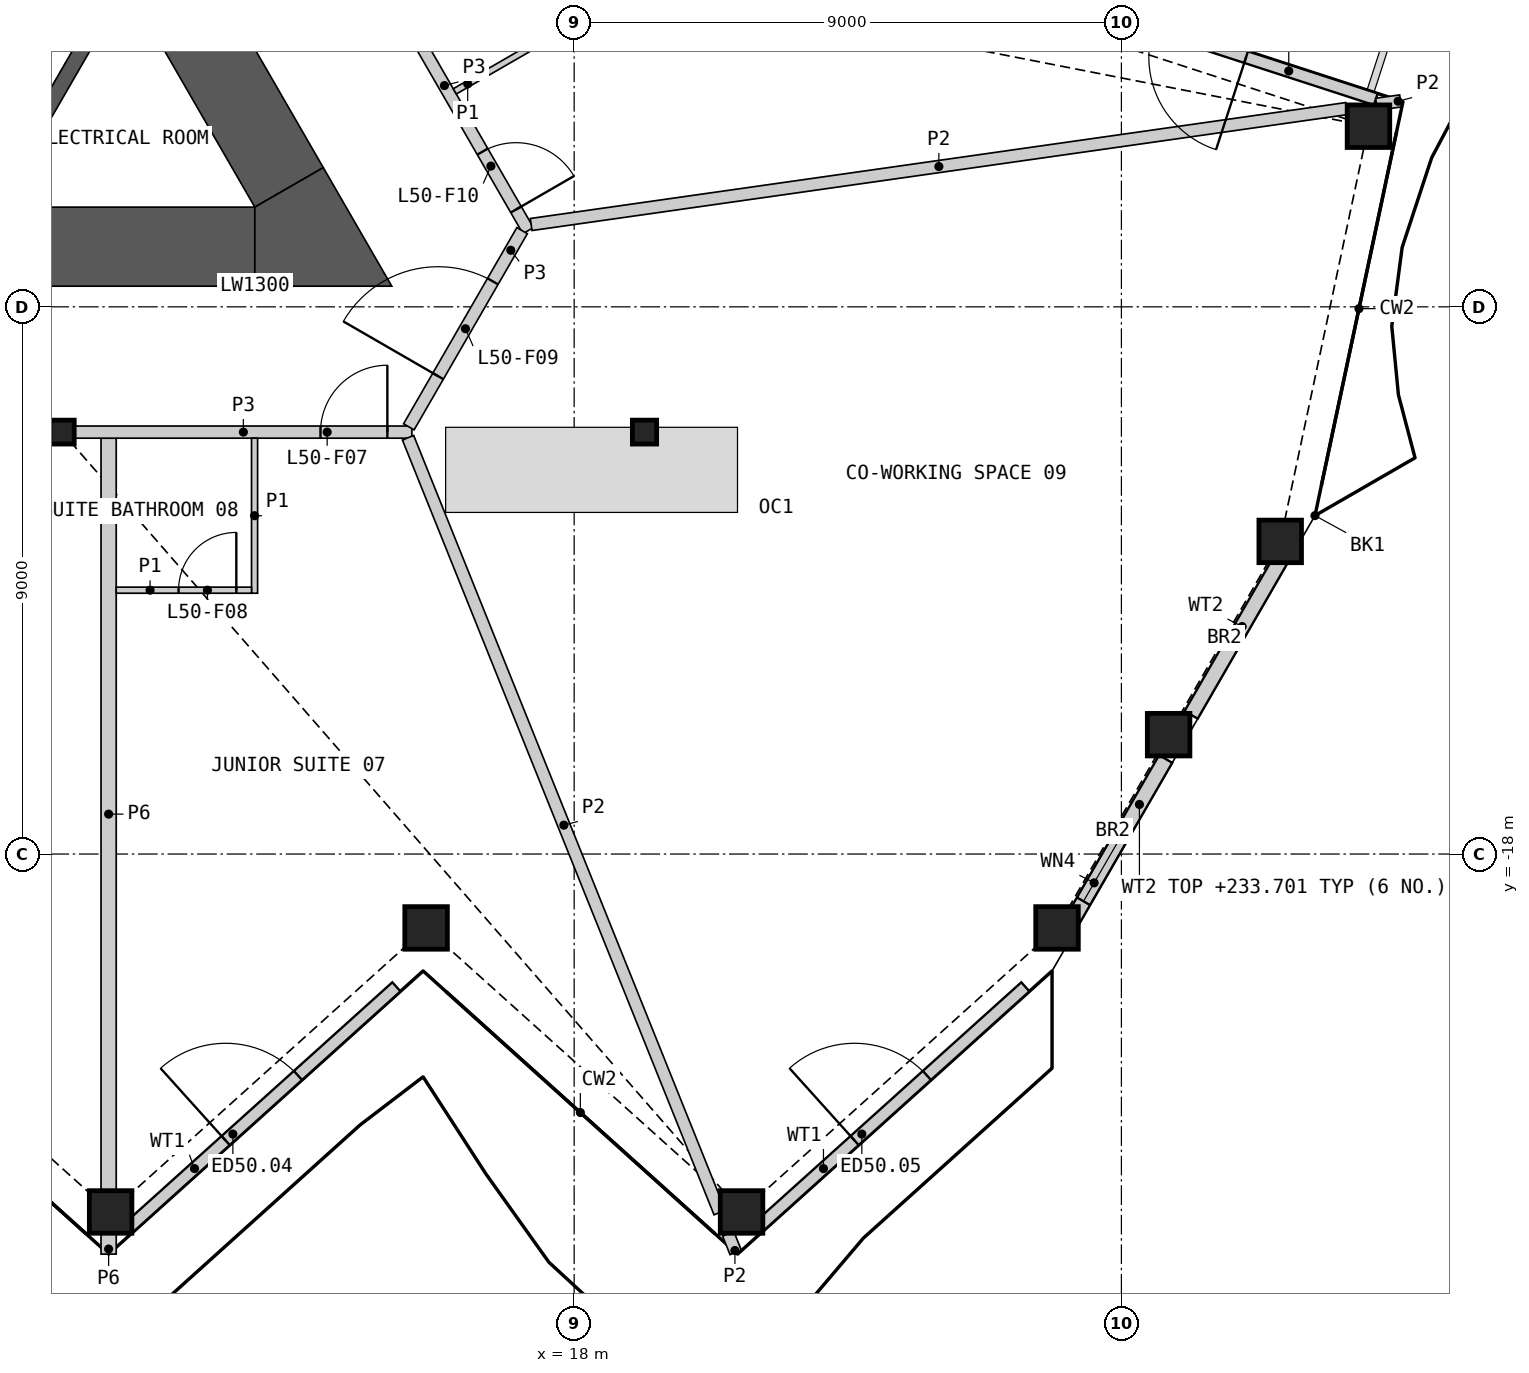
"""IFC4 building model, lengths in metres.
Left out: names, types, materials, properties, quantities, classifications, styles, units other than length and angle.
Written with IfcOpenShell. Run it as: python <this file> out.ifc"""

import sys

from ifc_helpers import new_model, si_unit, direction, frame, frame_2d, origin, origin_2d, place, context, subcontext, project, spatial, polyline, rectangle, hollow_rectangle, i_section, outline, extrude, element, fill, save


model = new_model("IFC4")
c1 = context("Model", 3, precision=1e-05, world=origin(), true_north=direction((0.0, 1.0)))
c2 = subcontext(c1, "Body", "Model", "MODEL_VIEW")
j1 = project(units=[si_unit("LENGTHUNIT", "METRE"), si_unit("PLANEANGLEUNIT", "RADIAN")], contexts=[c1])
p1 = place(None, origin())
s1 = spatial("IfcSite", under=j1, at=p1, CompositionType="ELEMENT")
p2 = place(p1, origin())
s2 = spatial("IfcBuilding", under=s1, at=p2, CompositionType="ELEMENT")
p3 = place(p2, frame((0.0, 0.0, 231.0)))
s3 = spatial("IfcBuildingStorey", under=s2, at=p3, CompositionType="ELEMENT", Elevation=231.0)
for number, where, z_axis, x_axis in (
    (1, (10.376, -23.887, 0.0), (0.0, 0.0, 1.0), (1.0, 0.0, 0.0)),
    (2, (15.565, -19.215, 0.0), (0.0, 0.0, 1.0), (1.0, 0.0, 0.0)),
    (3, (20.753, -23.887, 0.0), (0.0, 0.0, 1.0), (1.0, 0.0, 0.0)),
    (4, (25.941, -19.215, 0.0), (0.0, 0.0, 1.0), (1.0, 0.0, 0.0)),
    (5, (27.776, -16.037, 0.0), (0.0, 0.0, 1.0), (1.0, 0.0, 0.0)),
    (6, (29.612, -12.858, 0.0), (0.0, 0.0, 1.0), (1.0, 0.0, 0.0)),
    (7, (31.063, -6.029, 0.0), (0.0, 0.0, 1.0), (1.0, 0.0, 0.0)),
):
    element("IfcColumn", number, at=place(p3, frame(where, z_axis=z_axis, x_axis=x_axis)), inside=s3, PredefinedType="COLUMN", context=c2, shape_type="SweptSolid", body=[
        extrude(hollow_rectangle(XDim=0.7, YDim=0.7, WallThickness=0.045, at=origin_2d()), origin(), (0.0, 0.0, 1.0), 3.6),
    ])
for number, where, z_axis, x_axis in (
    (8, (9.578, -11.06, 0.0), (0.0, 0.0, 1.0), (1.0, 0.0, 0.0)),
    (9, (19.157, -11.06, 0.0), (0.0, 0.0, 1.0), (1.0, 0.0, 0.0)),
):
    element("IfcColumn", number, at=place(p3, frame(where, z_axis=z_axis, x_axis=x_axis)), inside=s3, PredefinedType="COLUMN", context=c2, shape_type="SweptSolid", body=[
        extrude(i_section(OverallWidth=0.399, OverallDepth=0.393, WebThickness=0.023, FlangeThickness=0.037, at=origin_2d()), origin(), (0.0, 0.0, 1.0), 3.6),
    ])
p4 = place(p3, frame((10.649, -24.17, 0.0), z_axis=(0.0, 0.0, 1.0), x_axis=(0.743143336638, 0.669132259878, 0.0)))
e10 = element("IfcWall", 10, at=p4, inside=s3, PredefinedType="SOLIDWALL", context=c2, shape_type="SweptSolid", body=[
    extrude(rectangle(XDim=5.958, YDim=0.2, at=frame_2d((2.979, 0.0))), origin(), (0.0, 0.0, 1.0), 2.701),
])
p5 = place(p4, frame((2.179, 0.0, 0.0)))
e11 = element("IfcOpeningElement", 11, at=p5, cuts=e10, PredefinedType="OPENING", context=c2, shape_type="SweptSolid", body=[
    extrude(rectangle(XDim=1.6, YDim=2.4, at=frame_2d((0.8, 1.2))), frame((0.0, 0.11, 0.0), z_axis=(0.0, -1.0, 0.0), x_axis=(1.0, 0.0, 0.0)), (0.0, 0.0, 1.0), 0.22),
])
p6 = place(p3, frame((20.993, -24.17, 0.0), z_axis=(0.0, 0.0, 1.0), x_axis=(0.743143336638, 0.669132259878, 0.0)))
e12 = element("IfcWall", 12, at=p6, inside=s3, PredefinedType="SOLIDWALL", context=c2, shape_type="SweptSolid", body=[
    extrude(rectangle(XDim=5.958, YDim=0.2, at=frame_2d((2.979, 0.0))), origin(), (0.0, 0.0, 1.0), 2.701),
])
p7 = place(p6, frame((2.179, 0.0, 0.0)))
e13 = element("IfcOpeningElement", 13, at=p7, cuts=e12, PredefinedType="OPENING", context=c2, shape_type="SweptSolid", body=[
    extrude(rectangle(XDim=1.6, YDim=2.4, at=frame_2d((0.8, 1.2))), frame((0.0, 0.11, 0.0), z_axis=(0.0, -1.0, 0.0), x_axis=(1.0, 0.0, 0.0)), (0.0, 0.0, 1.0), 0.22),
])
p8 = place(p3, frame((26.002, -19.427, 0.0), z_axis=(0.0, 0.0, 1.0), x_axis=(0.499987726745, 0.866032489635, 0.0)))
e14 = element("IfcWall", 14, at=p8, inside=s3, PredefinedType="SOLIDWALL", context=c2, shape_type="SweptSolid", body=[
    extrude(rectangle(XDim=3.452, YDim=0.25, at=frame_2d((1.726, 0.0))), origin(), (0.0, 0.0, 1.0), 2.701),
])
p9 = place(p8, frame((0.75, 0.0, 1.8)))
e15 = element("IfcOpeningElement", 15, at=p9, cuts=e14, PredefinedType="OPENING", context=c2, shape_type="SweptSolid", body=[
    extrude(rectangle(XDim=1.4, YDim=0.7, at=frame_2d((0.7, 0.35))), frame((0.0, 0.135, 0.0), z_axis=(0.0, -1.0, 0.0), x_axis=(1.0, 0.0, 0.0)), (0.0, 0.0, 1.0), 0.27),
])
p10 = place(p3, frame((28.146, -15.712, 0.0), z_axis=(0.0, 0.0, 1.0), x_axis=(0.500003693016, 0.86602327161, 0.0)))
e16 = element("IfcWall", 16, at=p10, inside=s3, PredefinedType="SOLIDWALL", context=c2, shape_type="SweptSolid", body=[
    extrude(rectangle(XDim=3.356, YDim=0.25, at=frame_2d((1.678, 0.0))), origin(), (0.0, 0.0, 1.0), 2.701),
])
p11 = place(p3, frame((31.184, -5.586, 0.0), z_axis=(0.0, 0.0, 1.0), x_axis=(-0.95106415783, 0.30899347516, 0.0)))
e17 = element("IfcWall", 17, at=p11, inside=s3, PredefinedType="SOLIDWALL", context=c2, shape_type="SweptSolid", body=[
    extrude(rectangle(XDim=6.021, YDim=0.2, at=frame_2d((3.011, 0.0))), origin(), (0.0, 0.0, 1.0), 2.701),
])
p12 = place(p11, frame((2.243, 0.0, 0.0)))
e18 = element("IfcOpeningElement", 18, at=p12, cuts=e17, PredefinedType="OPENING", context=c2, shape_type="SweptSolid", body=[
    extrude(rectangle(XDim=1.6, YDim=2.4, at=frame_2d((0.8, 1.2))), frame((0.0, 0.11, 0.0), z_axis=(0.0, -1.0, 0.0), x_axis=(1.0, 0.0, 0.0)), (0.0, 0.0, 1.0), 0.22),
])
p13 = place(p3, origin())
e19 = element("IfcWall", 19, at=p13, inside=s3, PredefinedType="SHEAR", context=c2, shape_type="SweptSolid", body=[
    extrude(outline(polyline([(8.83, -6.881), (10.374, -4.206), (10.032, -4.298), (8.738, -6.539), (8.83, -6.881)])), origin(), (0.0, 0.0, 1.0), 3.25),
])
p14 = place(p3, frame((-12.748, -8.01, 0.0), z_axis=(0.0, 0.0, 1.0), x_axis=(1.0, 0.0, 0.0)))
e20 = element("IfcWall", 20, at=p14, inside=s3, PredefinedType="SHEAR", context=c2, shape_type="SweptSolid", body=[
    extrude(rectangle(XDim=25.497, YDim=1.3, at=frame_2d((12.748, 0.0))), origin(), (0.0, 0.0, 1.0), 3.25),
])
p15 = place(p3, frame((13.311, -7.035, 0.0), z_axis=(0.0, 0.0, 1.0), x_axis=(-0.500003555838, 0.866023350811, 0.0)))
e21 = element("IfcWall", 21, at=p15, inside=s3, PredefinedType="SHEAR", context=c2, shape_type="SweptSolid", body=[
    extrude(rectangle(XDim=4.26, YDim=1.3, at=frame_2d((2.13, 0.0))), origin(), (0.0, 0.0, 1.0), 3.25),
])
p16 = place(p3, origin())
e22 = element("IfcWall", 22, at=p16, inside=s3, PredefinedType="SHEAR", context=c2, shape_type="SweptSolid", body=[
    extrude(outline(polyline([(12.748, -8.66), (12.748, -7.36), (13.874, -6.71), (15.0, -8.66), (12.748, -8.66)])), origin(), (0.0, 0.0, 1.0), 3.25),
])
p17 = place(p3, frame((10.344, -23.527, 0.0), z_axis=(0.0, 0.0, 1.0), x_axis=(0.0, 1.0, 0.0)))
e23 = element("IfcWall", 23, at=p17, inside=s3, PredefinedType="PARTITIONING", context=c2, shape_type="SweptSolid", body=[
    extrude(rectangle(XDim=12.366, YDim=0.25, at=frame_2d((6.183, 0.0))), origin(), (0.0, 0.0, 1.0), 2.404),
])
p18 = place(p3, frame((9.788, -11.06, 0.0), z_axis=(0.0, 0.0, 1.0), x_axis=(1.0, 0.0, 0.0)))
e24 = element("IfcWall", 24, at=p18, inside=s3, PredefinedType="PARTITIONING", context=c2, shape_type="SweptSolid", body=[
    extrude(rectangle(XDim=5.543, YDim=0.2, at=frame_2d((2.771, 0.0))), origin(), (0.0, 0.0, 1.0), 3.25),
])
p19 = place(p18, frame((4.04, 0.0, 0.0)))
e25 = element("IfcOpeningElement", 25, at=p19, cuts=e24, PredefinedType="OPENING", context=c2, shape_type="SweptSolid", body=[
    extrude(rectangle(XDim=1.1, YDim=2.1, at=frame_2d((0.55, 1.05))), frame((0.0, 0.11, 0.0), z_axis=(0.0, -1.0, 0.0), x_axis=(1.0, 0.0, 0.0)), (0.0, 0.0, 1.0), 0.22),
])
p20 = place(p3, frame((14.489, -2.975, 0.0), z_axis=(0.0, 0.0, 1.0), x_axis=(0.500017753321, -0.866015153657, 0.0)))
e26 = element("IfcWall", 26, at=p20, inside=s3, PredefinedType="PARTITIONING", context=c2, shape_type="SweptSolid", body=[
    extrude(rectangle(XDim=5.51, YDim=0.2, at=frame_2d((2.755, 0.0))), origin(), (0.0, 0.0, 1.0), 3.25),
])
p21 = place(p20, frame((4.01, 0.0, 0.0)))
e27 = element("IfcOpeningElement", 27, at=p21, cuts=e26, PredefinedType="OPENING", context=c2, shape_type="SweptSolid", body=[
    extrude(rectangle(XDim=1.1, YDim=2.1, at=frame_2d((0.55, 1.05))), frame((0.0, 0.11, 0.0), z_axis=(0.0, -1.0, 0.0), x_axis=(1.0, 0.0, 0.0)), (0.0, 0.0, 1.0), 0.22),
])
p22 = place(p3, frame((15.281, -10.974, 0.0), z_axis=(0.0, 0.0, 1.0), x_axis=(0.499958791762, 0.866049194065, 0.0)))
e28 = element("IfcWall", 28, at=p22, inside=s3, PredefinedType="PARTITIONING", context=c2, shape_type="SweptSolid", body=[
    extrude(rectangle(XDim=3.726, YDim=0.2, at=frame_2d((1.863, 0.0))), origin(), (0.0, 0.0, 1.0), 3.25),
])
p23 = place(p22, frame((0.963, 0.0, 0.0)))
e29 = element("IfcOpeningElement", 29, at=p23, cuts=e28, PredefinedType="OPENING", context=c2, shape_type="SweptSolid", body=[
    extrude(rectangle(XDim=1.8, YDim=2.1, at=frame_2d((0.9, 1.05))), frame((0.0, 0.11, 0.0), z_axis=(0.0, -1.0, 0.0), x_axis=(1.0, 0.0, 0.0)), (0.0, 0.0, 1.0), 0.22),
])
p24 = place(p3, frame((10.344, -24.58, 0.0), z_axis=(0.0, 0.0, 1.0), x_axis=(0.0, 1.0, 0.0)))
e30 = element("IfcWall", 30, at=p24, inside=s3, PredefinedType="PARTITIONING", context=c2, shape_type="SweptSolid", body=[
    extrude(rectangle(XDim=0.333, YDim=0.25, at=frame_2d((0.167, 0.0))), origin(), (0.0, 0.0, 1.0), 2.404),
])
p25 = place(p3, frame((15.268, -11.153, 0.0), z_axis=(0.0, 0.0, 1.0), x_axis=(0.373096979113, -0.927792349708, 0.0)))
e31 = element("IfcWall", 31, at=p25, inside=s3, PredefinedType="PARTITIONING", context=c2, shape_type="SweptSolid", body=[
    extrude(rectangle(XDim=13.736, YDim=0.2, at=frame_2d((6.868, 0.0))), origin(), (0.0, 0.0, 1.0), 2.404),
])
p26 = place(p3, frame((17.293, -7.646, 0.0), z_axis=(0.0, 0.0, 1.0), x_axis=(0.990042285303, 0.140770285614, 0.0)))
e32 = element("IfcWall", 32, at=p26, inside=s3, PredefinedType="PARTITIONING", context=c2, shape_type="SweptSolid", body=[
    extrude(rectangle(XDim=13.545, YDim=0.2, at=frame_2d((6.772, 0.0))), origin(), (0.0, 0.0, 1.0), 2.404),
])
p27 = place(p3, frame((31.196, -5.669, 0.0), z_axis=(0.0, 0.0, 1.0), x_axis=(0.990010701632, 0.140992236146, 0.0)))
e33 = element("IfcWall", 33, at=p27, inside=s3, PredefinedType="PARTITIONING", context=c2, shape_type="SweptSolid", body=[
    extrude(rectangle(XDim=0.398, YDim=0.2, at=frame_2d((0.199, 0.0))), origin(), (0.0, 0.0, 1.0), 2.404),
])
p28 = place(p3, frame((20.534, -24.247, 0.0), z_axis=(0.0, 0.0, 1.0), x_axis=(0.372801499492, -0.927911117498, 0.0)))
e34 = element("IfcWall", 34, at=p28, inside=s3, PredefinedType="PARTITIONING", context=c2, shape_type="SweptSolid", body=[
    extrude(rectangle(XDim=0.328, YDim=0.2, at=frame_2d((0.164, 0.0))), origin(), (0.0, 0.0, 1.0), 2.404),
])
p29 = place(p3, frame((16.037, -5.456, 0.0), z_axis=(0.0, 0.0, 1.0), x_axis=(0.865989751695, 0.500061746146, 0.0)))
e35 = element("IfcWall", 35, at=p29, inside=s3, PredefinedType="PARTITIONING", context=c2, shape_type="SweptSolid", body=[
    extrude(rectangle(XDim=2.45, YDim=0.1, at=frame_2d((1.225, 0.0))), origin(), (0.0, 0.0, 1.0), 2.404),
])
p30 = place(p3, frame((12.744, -13.71, 0.0), z_axis=(0.0, 0.0, 1.0), x_axis=(0.0, 1.0, 0.0)))
e36 = element("IfcWall", 36, at=p30, inside=s3, PredefinedType="PARTITIONING", context=c2, shape_type="SweptSolid", body=[
    extrude(rectangle(XDim=2.55, YDim=0.1, at=frame_2d((1.275, 0.0))), origin(), (0.0, 0.0, 1.0), 2.404),
])
p31 = place(p3, frame((10.469, -13.66, 0.0), z_axis=(0.0, 0.0, 1.0), x_axis=(1.0, 0.0, 0.0)))
e37 = element("IfcWall", 37, at=p31, inside=s3, PredefinedType="PARTITIONING", context=c2, shape_type="SweptSolid", body=[
    extrude(rectangle(XDim=2.225, YDim=0.1, at=frame_2d((1.113, 0.0))), origin(), (0.0, 0.0, 1.0), 2.404),
])
p32 = place(p31, frame((1.025, 0.0, 0.0)))
e38 = element("IfcOpeningElement", 38, at=p32, cuts=e37, PredefinedType="OPENING", context=c2, shape_type="SweptSolid", body=[
    extrude(rectangle(XDim=0.95, YDim=2.1, at=frame_2d((0.475, 1.05))), frame((0.0, 0.06, 0.0), z_axis=(0.0, -1.0, 0.0), x_axis=(1.0, 0.0, 0.0)), (0.0, 0.0, 1.0), 0.12),
])
p33 = place(p5, origin())
e39 = element("IfcDoor", 39, at=p33, inside=s3, OperationType="DOUBLE_DOOR_SINGLE_SWING", PredefinedType="DOOR", context=c2, shape_type="SweptSolid", body=[
    extrude(rectangle(XDim=1.6, YDim=2.4, at=frame_2d((0.8, 1.2))), frame((0.0, 0.025, 0.0), z_axis=(0.0, -1.0, 0.0), x_axis=(1.0, 0.0, 0.0)), (0.0, 0.0, 1.0), 0.05),
])
fill(e11, e39)
p34 = place(p7, origin())
e40 = element("IfcDoor", 40, at=p34, inside=s3, OperationType="DOUBLE_DOOR_SINGLE_SWING", PredefinedType="DOOR", context=c2, shape_type="SweptSolid", body=[
    extrude(rectangle(XDim=1.6, YDim=2.4, at=frame_2d((0.8, 1.2))), frame((0.0, 0.025, 0.0), z_axis=(0.0, -1.0, 0.0), x_axis=(1.0, 0.0, 0.0)), (0.0, 0.0, 1.0), 0.05),
])
fill(e13, e40)
p35 = place(p9, origin())
e41 = element("IfcWindow", 41, at=p35, inside=s3, PartitioningType="SINGLE_PANEL", PredefinedType="WINDOW", context=c2, shape_type="SweptSolid", body=[
    extrude(rectangle(XDim=1.4, YDim=0.7, at=frame_2d((0.7, 0.35))), frame((0.0, 0.03, 0.0), z_axis=(0.0, -1.0, 0.0), x_axis=(1.0, 0.0, 0.0)), (0.0, 0.0, 1.0), 0.06),
])
fill(e15, e41)
p36 = place(p12, origin())
e42 = element("IfcDoor", 42, at=p36, inside=s3, OperationType="DOUBLE_DOOR_SINGLE_SWING", PredefinedType="DOOR", context=c2, shape_type="SweptSolid", body=[
    extrude(rectangle(XDim=1.6, YDim=2.4, at=frame_2d((0.8, 1.2))), frame((0.0, 0.025, 0.0), z_axis=(0.0, -1.0, 0.0), x_axis=(1.0, 0.0, 0.0)), (0.0, 0.0, 1.0), 0.05),
])
fill(e18, e42)
p37 = place(p19, origin())
e43 = element("IfcDoor", 43, at=p37, inside=s3, OperationType="SINGLE_SWING_RIGHT", PredefinedType="DOOR", context=c2, shape_type="SweptSolid", body=[
    extrude(rectangle(XDim=1.1, YDim=2.1, at=frame_2d((0.55, 1.05))), frame((0.0, 0.025, 0.0), z_axis=(0.0, -1.0, 0.0), x_axis=(1.0, 0.0, 0.0)), (0.0, 0.0, 1.0), 0.05),
])
fill(e25, e43)
p38 = place(p32, origin())
e44 = element("IfcDoor", 44, at=p38, inside=s3, OperationType="SINGLE_SWING_RIGHT", PredefinedType="DOOR", context=c2, shape_type="SweptSolid", body=[
    extrude(rectangle(XDim=0.95, YDim=2.1, at=frame_2d((0.475, 1.05))), frame((0.0, 0.025, 0.0), z_axis=(0.0, -1.0, 0.0), x_axis=(1.0, 0.0, 0.0)), (0.0, 0.0, 1.0), 0.05),
])
fill(e38, e44)
p39 = place(p23, origin())
e45 = element("IfcDoor", 45, at=p39, inside=s3, OperationType="DOUBLE_DOOR_SINGLE_SWING", PredefinedType="DOOR", context=c2, shape_type="SweptSolid", body=[
    extrude(rectangle(XDim=1.8, YDim=2.1, at=frame_2d((0.9, 1.05))), frame((0.0, 0.025, 0.0), z_axis=(0.0, -1.0, 0.0), x_axis=(1.0, 0.0, 0.0)), (0.0, 0.0, 1.0), 0.05),
])
fill(e29, e45)
p40 = place(p21, origin())
e46 = element("IfcDoor", 46, at=p40, inside=s3, OperationType="SINGLE_SWING_RIGHT", PredefinedType="DOOR", context=c2, shape_type="SweptSolid", body=[
    extrude(rectangle(XDim=1.1, YDim=2.1, at=frame_2d((0.55, 1.05))), frame((0.0, 0.025, 0.0), z_axis=(0.0, -1.0, 0.0), x_axis=(1.0, 0.0, 0.0)), (0.0, 0.0, 1.0), 0.05),
])
fill(e27, e46)
save(model, sys.argv[1])
